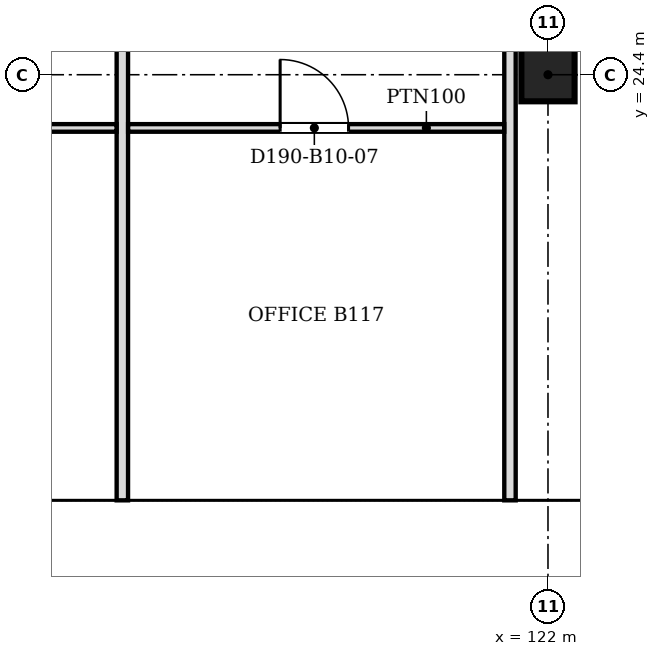
"""IFC4 building model, lengths in metres.
Left out: names, types, materials, properties, quantities, classifications, styles, units other than length and angle.
Written with IfcOpenShell. Run it as: python <this file> out.ifc"""

import sys

from ifc_helpers import new_model, si_unit, direction, frame, frame_2d, origin, origin_2d, place, context, subcontext, project, spatial, polyline, rectangle, outline, extrude, faceted_brep, source, transform, mapped, element, fill, save


model = new_model("IFC4")
c1 = context("Model", 3, precision=1e-05, world=origin(), true_north=direction((0.0, 1.0)))
c2 = subcontext(c1, "Body", "Model", "MODEL_VIEW")
j1 = project(units=[si_unit("LENGTHUNIT", "METRE"), si_unit("PLANEANGLEUNIT", "RADIAN")], contexts=[c1])
p1 = place(None, origin())
s1 = spatial("IfcSite", under=j1, at=p1, CompositionType="ELEMENT")
p2 = place(p1, origin())
s2 = spatial("IfcBuilding", under=s1, at=p2, CompositionType="ELEMENT")
p3 = place(p2, frame((0.0, 0.0, 99.0)))
s3 = spatial("IfcBuildingStorey", under=s2, at=p3, CompositionType="ELEMENT", Elevation=99.0)
p4 = place(p3, frame((122.0, 24.4, 0.0), z_axis=(0.0, 0.0, 1.0), x_axis=(1.0, 0.0, 0.0)))
e1 = element("IfcColumn", 1, at=p4, inside=s3, PredefinedType="COLUMN", context=c2, shape_type="SweptSolid", body=[
    extrude(rectangle(XDim=0.7, YDim=0.7, at=origin_2d()), origin(), (0.0, 0.0, 1.0), 3.6),
])
m1 = source(origin(), c2, "Body", "Brep", [
    faceted_brep([(3.05, -0.25, 0.0), (6.1, -0.25, 3.8), (6.1, -0.25, 3.8), (3.05, -0.25, 7.6), (0.0, -0.25, 3.8), (0.0, 0.25, 3.8), (3.05, 0.25, 7.6), (6.1, 0.25, 3.8), (6.1, 0.25, 3.8), (3.05, 0.25, 0.0)], [[[0, 1, 2, 3, 4]], [[5, 6, 7, 8, 9]], [[9, 8, 1, 0]], [[7, 6, 3, 2]], [[6, 5, 4, 3]], [[5, 9, 0, 4]], [[1, 8, 7, 2]]]),
])
p5 = place(p3, frame((109.8, 18.55, -3.8), z_axis=(0.0, 0.0, 1.0), x_axis=(1.0, 0.0, 0.0)))
e2 = element("IfcWall", 2, at=p5, inside=s3, PredefinedType="SOLIDWALL", context=c2, shape_type="MappedRepresentation", body=[
    mapped(m1, transform((0.0, 0.0, 0.0), scale=1.0)),
])
m2 = source(origin(), c2, "Body", "SweptSolid", [
    extrude(outline(polyline([(3.05, 0.399), (5.78, 3.8), (3.05, 7.201), (0.321, 3.8), (3.05, 0.399)])), frame((0.0, 0.26, 0.0), z_axis=(0.0, -1.0, 0.0), x_axis=(1.0, 0.0, 0.0)), (0.0, 0.0, 1.0), 0.52),
])
p6 = place(p5, origin())
e3 = element("IfcOpeningElement", 3, at=p6, cuts=e2, PredefinedType="OPENING", context=c2, shape_type="MappedRepresentation", body=[
    mapped(m2, transform((0.0, 0.0, 0.0), scale=1.0)),
])
m3 = source(origin(), c2, "Body", "SweptSolid", [
    extrude(outline(polyline([(3.05, 0.0), (6.1, 3.8), (3.05, 7.6), (0.0, 3.8), (3.05, 0.0)])), frame((0.0, 0.25, 0.0), z_axis=(0.0, -1.0, 0.0), x_axis=(1.0, 0.0, 0.0)), (0.0, 0.0, 1.0), 0.5),
])
p7 = place(p3, frame((115.9, 18.55, -3.8), z_axis=(0.0, 0.0, 1.0), x_axis=(1.0, 0.0, 0.0)))
e4 = element("IfcWall", 4, at=p7, inside=s3, PredefinedType="SOLIDWALL", context=c2, shape_type="MappedRepresentation", body=[
    mapped(m3, transform((0.0, 0.0, 0.0), scale=1.0)),
])
p8 = place(p7, origin())
e5 = element("IfcOpeningElement", 5, at=p8, cuts=e4, PredefinedType="OPENING", context=c2, shape_type="MappedRepresentation", body=[
    mapped(m2, transform((0.0, 0.0, 0.0), scale=1.0)),
])
m4 = source(origin(), c2, "Body", "Brep", [
    faceted_brep([(2.8, -0.25, 0.0), (3.05, -0.25, 0.339), (3.05, -0.25, 7.261), (2.8, -0.25, 7.6), (0.0, -0.25, 3.8), (0.0, 0.25, 3.8), (2.55, 0.25, 7.261), (2.55, 0.25, 0.339), (2.8, 0.0, 0.0), (2.8, 0.0, 7.6)], [[[0, 1, 2, 3, 4]], [[5, 6, 7]], [[1, 0, 8]], [[9, 3, 2]], [[6, 5, 4, 3, 9]], [[5, 7, 8, 0, 4]], [[1, 8, 7, 6, 9, 2]]]),
])
p9 = place(p3, frame((122.0, 18.55, -3.8), z_axis=(0.0, 0.0, 1.0), x_axis=(1.0, 0.0, 0.0)))
e6 = element("IfcWall", 6, at=p9, inside=s3, PredefinedType="SOLIDWALL", context=c2, shape_type="MappedRepresentation", body=[
    mapped(m4, transform((0.0, 0.0, 0.0), scale=1.0)),
])
m5 = source(origin(), c2, "Body", "SweptSolid", [
    extrude(outline(polyline([(2.6, 6.907), (0.311, 3.8), (2.6, 0.693), (2.6, 6.907)])), frame((0.0, 0.26, 0.0), z_axis=(0.0, -1.0, 0.0), x_axis=(1.0, 0.0, 0.0)), (0.0, 0.0, 1.0), 0.52),
])
p10 = place(p9, origin())
e7 = element("IfcOpeningElement", 7, at=p10, cuts=e6, PredefinedType="OPENING", context=c2, shape_type="MappedRepresentation", body=[
    mapped(m5, transform((0.0, 0.0, 0.0), scale=1.0)),
])
p11 = place(p2, frame((0.0, 0.0, 102.8)))
s4 = spatial("IfcBuildingStorey", under=s2, at=p11, CompositionType="ELEMENT", Elevation=102.8)
p12 = place(p11, frame((112.85, 18.55, -3.8), z_axis=(0.0, 0.0, 1.0), x_axis=(1.0, 0.0, 0.0)))
e8 = element("IfcWall", 8, at=p12, inside=s4, PredefinedType="SOLIDWALL", context=c2, shape_type="MappedRepresentation", body=[
    mapped(m1, transform((0.0, 0.0, 0.0), scale=1.0)),
])
p13 = place(p12, origin())
e9 = element("IfcOpeningElement", 9, at=p13, cuts=e8, PredefinedType="OPENING", context=c2, shape_type="MappedRepresentation", body=[
    mapped(m2, transform((0.0, 0.0, 0.0), scale=1.0)),
])
m6 = source(origin(), c2, "Body", "Brep", [
    faceted_brep([(3.05, -0.25, 0.0), (5.85, -0.25, 3.8), (3.05, -0.25, 7.6), (0.0, -0.25, 3.8), (0.0, 0.25, 3.8), (3.05, 0.25, 7.6), (5.6, 0.25, 4.139), (5.6, 0.25, 3.461), (3.05, 0.25, 0.0), (5.85, 0.0, 3.8)], [[[0, 1, 2, 3]], [[4, 5, 6, 7, 8]], [[8, 7, 9, 1, 0]], [[6, 5, 2, 1, 9]], [[5, 4, 3, 2]], [[4, 8, 0, 3]], [[9, 7, 6]]]),
])
p14 = place(p11, frame((118.95, 18.55, -3.8), z_axis=(0.0, 0.0, 1.0), x_axis=(1.0, 0.0, 0.0)))
e10 = element("IfcWall", 10, at=p14, inside=s4, PredefinedType="SOLIDWALL", context=c2, shape_type="MappedRepresentation", body=[
    mapped(m6, transform((0.0, 0.0, 0.0), scale=1.0)),
])
m7 = source(origin(), c2, "Body", "SweptSolid", [
    extrude(outline(polyline([(3.042, 0.41), (5.54, 3.8), (3.042, 7.19), (0.321, 3.8), (3.042, 0.41)])), frame((0.0, 0.26, 0.0), z_axis=(0.0, -1.0, 0.0), x_axis=(1.0, 0.0, 0.0)), (0.0, 0.0, 1.0), 0.52),
])
p15 = place(p14, origin())
e11 = element("IfcOpeningElement", 11, at=p15, cuts=e10, PredefinedType="OPENING", context=c2, shape_type="MappedRepresentation", body=[
    mapped(m7, transform((0.0, 0.0, 0.0), scale=1.0)),
])
p16 = place(p3, frame((116.4, 18.8, 0.0), z_axis=(0.0, 0.0, 1.0), x_axis=(0.0, 1.0, 0.0)))
e12 = element("IfcWall", 12, at=p16, inside=s3, PredefinedType="PARTITIONING", context=c2, shape_type="SweptSolid", body=[
    extrude(rectangle(XDim=12.15, YDim=0.15, at=frame_2d((6.075, 0.0))), origin(), (0.0, 0.0, 1.0), 3.067),
])
p17 = place(p3, frame((121.5, 18.8, 0.0), z_axis=(0.0, 0.0, 1.0), x_axis=(0.0, 1.0, 0.0)))
e13 = element("IfcWall", 13, at=p17, inside=s3, PredefinedType="PARTITIONING", context=c2, shape_type="SweptSolid", body=[
    extrude(rectangle(XDim=15.124, YDim=0.15, at=frame_2d((7.562, 0.0))), origin(), (0.0, 0.0, 1.0), 3.067),
])
p18 = place(p3, frame((116.324, 23.7, 0.0), z_axis=(0.0, 0.0, 1.0), x_axis=(-1.0, 0.0, 0.0)))
e14 = element("IfcWall", 14, at=p18, inside=s3, PredefinedType="PARTITIONING", context=c2, shape_type="SweptSolid", body=[
    extrude(rectangle(XDim=6.448, YDim=0.1, at=frame_2d((3.224, 0.0))), origin(), (0.0, 0.0, 1.0), 3.067),
])
m8 = source(origin(), c2, "Body", "SweptSolid", [
    extrude(rectangle(XDim=0.9, YDim=2.1, at=frame_2d((0.45, 1.05))), frame((0.0, 0.06, 0.0), z_axis=(0.0, -1.0, 0.0), x_axis=(1.0, 0.0, 0.0)), (0.0, 0.0, 1.0), 0.12),
])
p19 = place(p18, frame((2.748, 0.0, 0.0)))
e15 = element("IfcOpeningElement", 15, at=p19, cuts=e14, PredefinedType="OPENING", context=c2, shape_type="MappedRepresentation", body=[
    mapped(m8, transform((0.0, 0.0, 0.0), scale=1.0)),
])
p20 = place(p3, frame((121.424, 23.7, 0.0), z_axis=(0.0, 0.0, 1.0), x_axis=(-1.0, 0.0, 0.0)))
e16 = element("IfcWall", 16, at=p20, inside=s3, PredefinedType="PARTITIONING", context=c2, shape_type="SweptSolid", body=[
    extrude(rectangle(XDim=4.948, YDim=0.1, at=frame_2d((2.474, 0.0))), origin(), (0.0, 0.0, 1.0), 3.067),
])
p21 = place(p20, frame((2.048, 0.0, 0.0)))
e17 = element("IfcOpeningElement", 17, at=p21, cuts=e16, PredefinedType="OPENING", context=c2, shape_type="MappedRepresentation", body=[
    mapped(m8, transform((0.0, 0.0, 0.0), scale=1.0)),
])
m9 = source(origin(), c2, "Body", "SweptSolid", [
    extrude(rectangle(XDim=0.9, YDim=2.1, at=frame_2d((0.45, 1.05))), frame((0.0, 0.025, 0.0), z_axis=(0.0, -1.0, 0.0), x_axis=(1.0, 0.0, 0.0)), (0.0, 0.0, 1.0), 0.05),
])
p22 = place(p21, origin())
e18 = element("IfcDoor", 18, at=p22, inside=s3, OperationType="SINGLE_SWING_RIGHT", PredefinedType="DOOR", context=c2, shape_type="MappedRepresentation", body=[
    mapped(m9, transform((0.0, 0.0, 0.0), scale=1.0)),
])
fill(e17, e18)
save(model, sys.argv[1])
